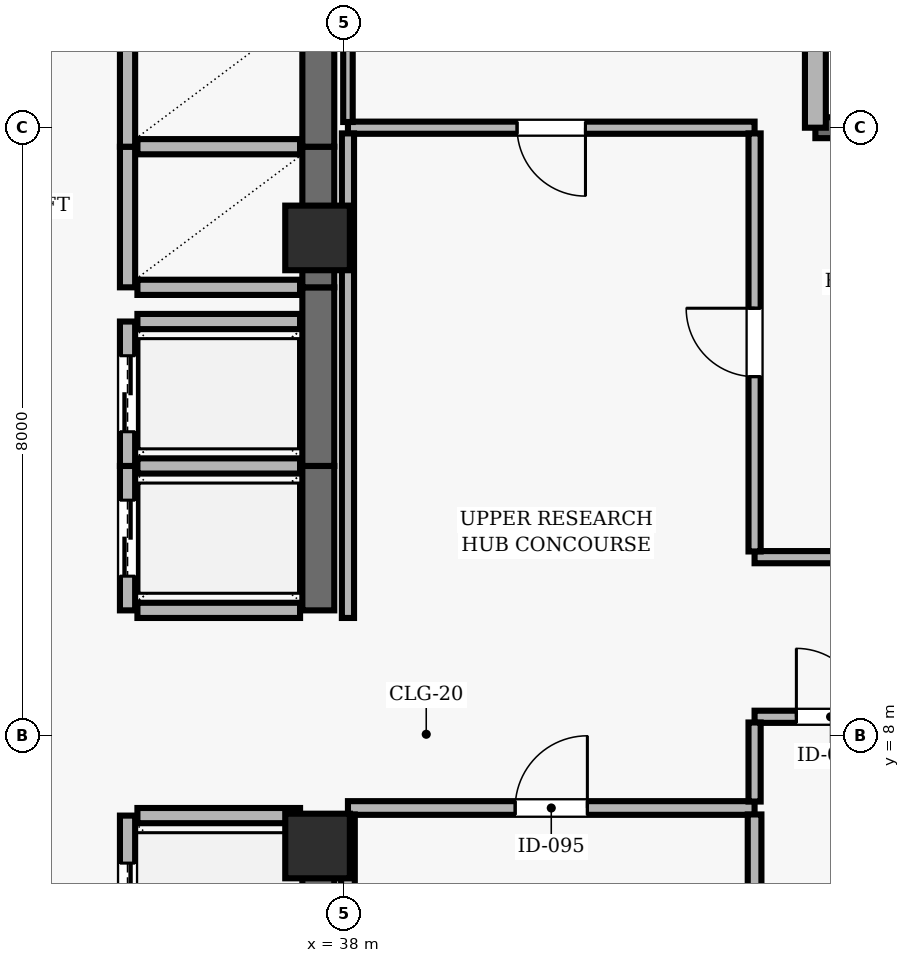
"""IFC4 building model, lengths in metres.
Left out: names, types, materials, properties, quantities, classifications, styles, units other than length and angle.
Written with IfcOpenShell. Run it as: python <this file> out.ifc"""

import sys

from ifc_helpers import new_model, si_unit, direction, frame, frame_2d, origin, origin_2d, place, context, subcontext, project, spatial, rectangle, extrude, element, fill, save


model = new_model("IFC4")
c1 = context("Model", 3, precision=1e-05, world=origin(), true_north=direction((0.0, 1.0)))
c2 = subcontext(c1, "Body", "Model", "MODEL_VIEW")
j1 = project(units=[si_unit("LENGTHUNIT", "METRE"), si_unit("PLANEANGLEUNIT", "RADIAN")], contexts=[c1])
p1 = place(None, origin())
s1 = spatial("IfcSite", under=j1, at=p1, CompositionType="ELEMENT")
p2 = place(p1, origin())
s2 = spatial("IfcBuilding", under=s1, at=p2, CompositionType="ELEMENT")
p3 = place(p2, frame((0.0, 0.0, 267.7)))
s3 = spatial("IfcBuildingStorey", under=s2, at=p3, CompositionType="ELEMENT", Elevation=267.7)
for number, where, z_axis, x_axis in (
    (1, (37.65, 6.55, 0.0), (0.0, 0.0, 1.0), (1.0, 0.0, 0.0)),
    (2, (37.65, 14.55, 0.0), (0.0, 0.0, 1.0), (1.0, 0.0, 0.0)),
):
    element("IfcColumn", number, at=place(p3, frame(where, z_axis=z_axis, x_axis=x_axis)), inside=s3, PredefinedType="COLUMN", context=c2, shape_type="SweptSolid", body=[
        extrude(rectangle(XDim=0.85, YDim=0.85, at=origin_2d()), origin(), (0.0, 0.0, 1.0), 3.9),
    ])
p4 = place(p3, frame((57.3, 16.0, 0.0), z_axis=(0.0, 0.0, 1.0), x_axis=(-1.0, 0.0, 0.0)))
e3 = element("IfcWall", 3, at=p4, inside=s3, PredefinedType="SOLIDWALL", context=c2, shape_type="SweptSolid", body=[
    extrude(rectangle(XDim=13.1, YDim=0.275, at=frame_2d((6.55, 0.0))), origin(), (0.0, 0.0, 1.0), 3.69),
])
p5 = place(p4, frame((7.05, 0.0, 0.0)))
e4 = element("IfcOpeningElement", 4, at=p5, cuts=e3, PredefinedType="OPENING", context=c2, shape_type="SweptSolid", body=[
    extrude(rectangle(XDim=1.0, YDim=2.2, at=frame_2d((0.5, 1.1))), frame((0.0, 0.147, 0.0), z_axis=(0.0, -1.0, 0.0), x_axis=(1.0, 0.0, 0.0)), (0.0, 0.0, 1.0), 0.295),
])
p6 = place(p4, frame((2.375, 0.0, 0.9)))
e5 = element("IfcOpeningElement", 5, at=p6, cuts=e3, PredefinedType="OPENING", context=c2, shape_type="SweptSolid", body=[
    extrude(rectangle(XDim=1.8, YDim=2.2, at=frame_2d((0.9, 1.1))), frame((0.0, 0.147, 0.0), z_axis=(0.0, -1.0, 0.0), x_axis=(1.0, 0.0, 0.0)), (0.0, 0.0, 1.0), 0.295),
])
p7 = place(p3, frame((44.2, 16.0, 0.0), z_axis=(0.0, 0.0, 1.0), x_axis=(0.0, 1.0, 0.0)))
e6 = element("IfcWall", 6, at=p7, inside=s3, PredefinedType="SOLIDWALL", context=c2, shape_type="SweptSolid", body=[
    extrude(rectangle(XDim=5.4, YDim=0.275, at=frame_2d((2.7, 0.0))), origin(), (0.0, 0.0, 1.0), 3.69),
])
p8 = place(p7, frame((1.5, 0.0, 0.9)))
e7 = element("IfcOpeningElement", 7, at=p8, cuts=e6, PredefinedType="OPENING", context=c2, shape_type="SweptSolid", body=[
    extrude(rectangle(XDim=2.4, YDim=2.2, at=frame_2d((1.2, 1.1))), frame((0.0, 0.147, 0.0), z_axis=(0.0, -1.0, 0.0), x_axis=(1.0, 0.0, 0.0)), (0.0, 0.0, 1.0), 0.295),
])
p9 = place(p3, frame((35.15, 6.95, 0.0), z_axis=(0.0, 0.0, 1.0), x_axis=(0.0, -1.0, 0.0)))
e8 = element("IfcWall", 8, at=p9, inside=s3, PredefinedType="SOLIDWALL", context=c2, shape_type="SweptSolid", body=[
    extrude(rectangle(XDim=2.25, YDim=0.2, at=frame_2d((1.125, 0.0))), origin(), (0.0, 0.0, 1.0), 3.69),
])
p10 = place(p9, frame((0.625, 0.0, 0.0)))
e9 = element("IfcOpeningElement", 9, at=p10, cuts=e8, PredefinedType="OPENING", context=c2, shape_type="SweptSolid", body=[
    extrude(rectangle(XDim=1.0, YDim=2.1, at=frame_2d((0.5, 1.05))), frame((0.0, 0.11, 0.0), z_axis=(0.0, -1.0, 0.0), x_axis=(1.0, 0.0, 0.0)), (0.0, 0.0, 1.0), 0.22),
])
p11 = place(p3, frame((37.66, 4.7, 0.0), z_axis=(0.0, 0.0, 1.0), x_axis=(0.0, 1.0, 0.0)))
e10 = element("IfcWall", 10, at=p11, inside=s3, PredefinedType="SHEAR", context=c2, shape_type="SweptSolid", body=[
    extrude(rectangle(XDim=2.25, YDim=0.42, at=frame_2d((1.125, 0.0))), origin(), (0.0, 0.0, 1.0), 3.69),
])
p12 = place(p3, frame((37.42, 6.95, 0.0), z_axis=(0.0, 0.0, 1.0), x_axis=(-1.0, 0.0, 0.0)))
e11 = element("IfcWall", 11, at=p12, inside=s3, PredefinedType="SOLIDWALL", context=c2, shape_type="SweptSolid", body=[
    extrude(rectangle(XDim=2.14, YDim=0.2, at=frame_2d((1.07, 0.0))), origin(), (0.0, 0.0, 1.0), 3.69),
])
p13 = place(p3, frame((35.15, 11.55, 0.0), z_axis=(0.0, 0.0, 1.0), x_axis=(0.0, -1.0, 0.0)))
e12 = element("IfcWall", 12, at=p13, inside=s3, PredefinedType="SOLIDWALL", context=c2, shape_type="SweptSolid", body=[
    extrude(rectangle(XDim=1.9, YDim=0.2, at=frame_2d((0.95, 0.0))), origin(), (0.0, 0.0, 1.0), 3.69),
])
p14 = place(p13, frame((0.45, 0.0, 0.0)))
e13 = element("IfcOpeningElement", 13, at=p14, cuts=e12, PredefinedType="OPENING", context=c2, shape_type="SweptSolid", body=[
    extrude(rectangle(XDim=1.0, YDim=2.1, at=frame_2d((0.5, 1.05))), frame((0.0, 0.11, 0.0), z_axis=(0.0, -1.0, 0.0), x_axis=(1.0, 0.0, 0.0)), (0.0, 0.0, 1.0), 0.22),
])
p15 = place(p3, frame((37.66, 9.65, 0.0), z_axis=(0.0, 0.0, 1.0), x_axis=(0.0, 1.0, 0.0)))
e14 = element("IfcWall", 14, at=p15, inside=s3, PredefinedType="SHEAR", context=c2, shape_type="SweptSolid", body=[
    extrude(rectangle(XDim=1.9, YDim=0.42, at=frame_2d((0.95, 0.0))), origin(), (0.0, 0.0, 1.0), 3.69),
])
for number, where, z_axis, x_axis in (
    (15, (35.28, 9.65, 0.0), (0.0, 0.0, 1.0), (1.0, 0.0, 0.0)),
    (16, (37.42, 11.55, 0.0), (0.0, 0.0, 1.0), (-1.0, 0.0, 0.0)),
):
    element("IfcWall", number, at=place(p3, frame(where, z_axis=z_axis, x_axis=x_axis)), inside=s3, PredefinedType="SOLIDWALL", context=c2, shape_type="SweptSolid", body=[
        extrude(rectangle(XDim=2.14, YDim=0.2, at=frame_2d((1.07, 0.0))), origin(), (0.0, 0.0, 1.0), 3.69),
    ])
p16 = place(p3, frame((35.15, 13.45, 0.0), z_axis=(0.0, 0.0, 1.0), x_axis=(0.0, -1.0, 0.0)))
e17 = element("IfcWall", 17, at=p16, inside=s3, PredefinedType="SOLIDWALL", context=c2, shape_type="SweptSolid", body=[
    extrude(rectangle(XDim=1.9, YDim=0.2, at=frame_2d((0.95, 0.0))), origin(), (0.0, 0.0, 1.0), 3.69),
])
p17 = place(p16, frame((0.45, 0.0, 0.0)))
e18 = element("IfcOpeningElement", 18, at=p17, cuts=e17, PredefinedType="OPENING", context=c2, shape_type="SweptSolid", body=[
    extrude(rectangle(XDim=1.0, YDim=2.1, at=frame_2d((0.5, 1.05))), frame((0.0, 0.11, 0.0), z_axis=(0.0, -1.0, 0.0), x_axis=(1.0, 0.0, 0.0)), (0.0, 0.0, 1.0), 0.22),
])
p18 = place(p3, frame((37.66, 11.55, 0.0), z_axis=(0.0, 0.0, 1.0), x_axis=(0.0, 1.0, 0.0)))
e19 = element("IfcWall", 19, at=p18, inside=s3, PredefinedType="SHEAR", context=c2, shape_type="SweptSolid", body=[
    extrude(rectangle(XDim=2.35, YDim=0.42, at=frame_2d((1.175, 0.0))), origin(), (0.0, 0.0, 1.0), 3.69),
])
p19 = place(p3, frame((37.42, 13.45, 0.0), z_axis=(0.0, 0.0, 1.0), x_axis=(-1.0, 0.0, 0.0)))
e20 = element("IfcWall", 20, at=p19, inside=s3, PredefinedType="SOLIDWALL", context=c2, shape_type="SweptSolid", body=[
    extrude(rectangle(XDim=2.14, YDim=0.2, at=frame_2d((1.07, 0.0))), origin(), (0.0, 0.0, 1.0), 3.69),
])
p20 = place(p3, frame((35.15, 15.75, 0.0), z_axis=(0.0, 0.0, 1.0), x_axis=(0.0, -1.0, 0.0)))
e21 = element("IfcWall", 21, at=p20, inside=s3, PredefinedType="SOLIDWALL", context=c2, shape_type="SweptSolid", body=[
    extrude(rectangle(XDim=1.85, YDim=0.2, at=frame_2d((0.925, 0.0))), origin(), (0.0, 0.0, 1.0), 3.69),
])
p21 = place(p3, frame((37.66, 13.9, 0.0), z_axis=(0.0, 0.0, 1.0), x_axis=(0.0, 1.0, 0.0)))
e22 = element("IfcWall", 22, at=p21, inside=s3, PredefinedType="SHEAR", context=c2, shape_type="SweptSolid", body=[
    extrude(rectangle(XDim=1.85, YDim=0.42, at=frame_2d((0.925, 0.0))), origin(), (0.0, 0.0, 1.0), 3.69),
])
for number, where, z_axis, x_axis in (
    (23, (35.28, 13.9, 0.0), (0.0, 0.0, 1.0), (1.0, 0.0, 0.0)),
    (24, (37.42, 15.75, 0.0), (0.0, 0.0, 1.0), (-1.0, 0.0, 0.0)),
):
    element("IfcWall", number, at=place(p3, frame(where, z_axis=z_axis, x_axis=x_axis)), inside=s3, PredefinedType="SOLIDWALL", context=c2, shape_type="SweptSolid", body=[
        extrude(rectangle(XDim=2.14, YDim=0.2, at=frame_2d((1.07, 0.0))), origin(), (0.0, 0.0, 1.0), 3.69),
    ])
p22 = place(p3, frame((35.15, 17.6, 0.0), z_axis=(0.0, 0.0, 1.0), x_axis=(0.0, -1.0, 0.0)))
e25 = element("IfcWall", 25, at=p22, inside=s3, PredefinedType="SOLIDWALL", context=c2, shape_type="SweptSolid", body=[
    extrude(rectangle(XDim=1.85, YDim=0.2, at=frame_2d((0.925, 0.0))), origin(), (0.0, 0.0, 1.0), 3.69),
])
p23 = place(p3, frame((37.66, 15.75, 0.0), z_axis=(0.0, 0.0, 1.0), x_axis=(0.0, 1.0, 0.0)))
e26 = element("IfcWall", 26, at=p23, inside=s3, PredefinedType="SHEAR", context=c2, shape_type="SweptSolid", body=[
    extrude(rectangle(XDim=1.85, YDim=0.42, at=frame_2d((0.925, 0.0))), origin(), (0.0, 0.0, 1.0), 3.69),
])
p24 = place(p3, frame((38.05, 7.05, 0.0), z_axis=(0.0, 0.0, 1.0), x_axis=(1.0, 0.0, 0.0)))
e27 = element("IfcWall", 27, at=p24, inside=s3, PredefinedType="PARTITIONING", context=c2, shape_type="SweptSolid", body=[
    extrude(rectangle(XDim=5.35, YDim=0.18, at=frame_2d((2.675, 0.0))), origin(), (0.0, 0.0, 1.0), 3.69),
])
p25 = place(p24, frame((2.2, 0.0, 0.0)))
e28 = element("IfcOpeningElement", 28, at=p25, cuts=e27, PredefinedType="OPENING", context=c2, shape_type="SweptSolid", body=[
    extrude(rectangle(XDim=0.95, YDim=2.1, at=frame_2d((0.475, 1.05))), frame((0.0, 0.1, 0.0), z_axis=(0.0, -1.0, 0.0), x_axis=(1.0, 0.0, 0.0)), (0.0, 0.0, 1.0), 0.2),
])
p26 = place(p3, frame((43.4, 8.25, 0.0), z_axis=(0.0, 0.0, 1.0), x_axis=(1.0, 0.0, 0.0)))
e29 = element("IfcWall", 29, at=p26, inside=s3, PredefinedType="PARTITIONING", context=c2, shape_type="SweptSolid", body=[
    extrude(rectangle(XDim=4.1, YDim=0.16, at=frame_2d((2.05, 0.0))), origin(), (0.0, 0.0, 1.0), 3.227),
])
p27 = place(p26, frame((0.55, 0.0, 0.0)))
e30 = element("IfcOpeningElement", 30, at=p27, cuts=e29, PredefinedType="OPENING", context=c2, shape_type="SweptSolid", body=[
    extrude(rectangle(XDim=0.9, YDim=2.1, at=frame_2d((0.45, 1.05))), frame((0.0, 0.09, 0.0), z_axis=(0.0, -1.0, 0.0), x_axis=(1.0, 0.0, 0.0)), (0.0, 0.0, 1.0), 0.18),
])
p28 = place(p3, frame((43.4, 16.0, 0.0), z_axis=(0.0, 0.0, 1.0), x_axis=(-1.0, 0.0, 0.0)))
e31 = element("IfcWall", 31, at=p28, inside=s3, PredefinedType="PARTITIONING", context=c2, shape_type="SweptSolid", body=[
    extrude(rectangle(XDim=5.35, YDim=0.16, at=frame_2d((2.675, 0.0))), origin(), (0.0, 0.0, 1.0), 3.39),
])
p29 = place(p28, frame((2.225, 0.0, 0.0)))
e32 = element("IfcOpeningElement", 32, at=p29, cuts=e31, PredefinedType="OPENING", context=c2, shape_type="SweptSolid", body=[
    extrude(rectangle(XDim=0.9, YDim=2.1, at=frame_2d((0.45, 1.05))), frame((0.0, 0.09, 0.0), z_axis=(0.0, -1.0, 0.0), x_axis=(1.0, 0.0, 0.0)), (0.0, 0.0, 1.0), 0.18),
])
p30 = place(p3, frame((47.5, 10.35, 0.0), z_axis=(0.0, 0.0, 1.0), x_axis=(-1.0, 0.0, 0.0)))
e33 = element("IfcWall", 33, at=p30, inside=s3, PredefinedType="PARTITIONING", context=c2, shape_type="SweptSolid", body=[
    extrude(rectangle(XDim=4.1, YDim=0.16, at=frame_2d((2.05, 0.0))), origin(), (0.0, 0.0, 1.0), 3.424),
])
p31 = place(p3, frame((38.05, 6.965, 0.0), z_axis=(0.0, 0.0, 1.0), x_axis=(0.0, -1.0, 0.0)))
e34 = element("IfcWall", 34, at=p31, inside=s3, PredefinedType="PARTITIONING", context=c2, shape_type="SweptSolid", body=[
    extrude(rectangle(XDim=6.832, YDim=0.18, at=frame_2d((3.416, 0.0))), origin(), (0.0, 0.0, 1.0), 3.227),
])
p32 = place(p3, frame((38.05, 15.925, 0.0), z_axis=(0.0, 0.0, 1.0), x_axis=(0.0, -1.0, 0.0)))
e35 = element("IfcWall", 35, at=p32, inside=s3, PredefinedType="PARTITIONING", context=c2, shape_type="SweptSolid", body=[
    extrude(rectangle(XDim=6.375, YDim=0.16, at=frame_2d((3.188, 0.0))), origin(), (0.0, 0.0, 1.0), 3.227),
])
p33 = place(p3, frame((38.05, 22.468, 0.0), z_axis=(0.0, 0.0, 1.0), x_axis=(0.0, -1.0, 0.0)))
e36 = element("IfcWall", 36, at=p33, inside=s3, PredefinedType="PARTITIONING", context=c2, shape_type="SweptSolid", body=[
    extrude(rectangle(XDim=6.393, YDim=0.125, at=frame_2d((3.197, 0.0))), origin(), (0.0, 0.0, 1.0), 3.227),
])
p34 = place(p3, frame((43.4, 0.133, 0.0), z_axis=(0.0, 0.0, 1.0), x_axis=(0.0, 1.0, 0.0)))
e37 = element("IfcWall", 37, at=p34, inside=s3, PredefinedType="PARTITIONING", context=c2, shape_type="SweptSolid", body=[
    extrude(rectangle(XDim=6.832, YDim=0.18, at=frame_2d((3.416, 0.0))), origin(), (0.0, 0.0, 1.0), 3.69),
])
p35 = place(p3, frame((43.4, 7.135, 0.0), z_axis=(0.0, 0.0, 1.0), x_axis=(0.0, 1.0, 0.0)))
e38 = element("IfcWall", 38, at=p35, inside=s3, PredefinedType="PARTITIONING", context=c2, shape_type="SweptSolid", body=[
    extrude(rectangle(XDim=1.04, YDim=0.16, at=frame_2d((0.52, 0.0))), origin(), (0.0, 0.0, 1.0), 3.69),
])
p36 = place(p3, frame((43.4, 10.425, 0.0), z_axis=(0.0, 0.0, 1.0), x_axis=(0.0, 1.0, 0.0)))
e39 = element("IfcWall", 39, at=p36, inside=s3, PredefinedType="PARTITIONING", context=c2, shape_type="SweptSolid", body=[
    extrude(rectangle(XDim=5.5, YDim=0.16, at=frame_2d((2.75, 0.0))), origin(), (0.0, 0.0, 1.0), 3.69),
])
p37 = place(p36, frame((2.3, 0.0, 0.0)))
e40 = element("IfcOpeningElement", 40, at=p37, cuts=e39, PredefinedType="OPENING", context=c2, shape_type="SweptSolid", body=[
    extrude(rectangle(XDim=0.9, YDim=2.1, at=frame_2d((0.45, 1.05))), frame((0.0, 0.09, 0.0), z_axis=(0.0, -1.0, 0.0), x_axis=(1.0, 0.0, 0.0)), (0.0, 0.0, 1.0), 0.18),
])
p38 = place(p10, origin())
e41 = element("IfcDoor", 41, at=p38, inside=s3, OperationType="DOUBLE_DOOR_SLIDING", PredefinedType="DOOR", context=c2, shape_type="SweptSolid", body=[
    extrude(rectangle(XDim=1.0, YDim=2.1, at=frame_2d((0.5, 1.05))), frame((0.0, 0.025, 0.0), z_axis=(0.0, -1.0, 0.0), x_axis=(1.0, 0.0, 0.0)), (0.0, 0.0, 1.0), 0.05),
])
fill(e9, e41)
p39 = place(p14, origin())
e42 = element("IfcDoor", 42, at=p39, inside=s3, OperationType="DOUBLE_DOOR_SLIDING", PredefinedType="DOOR", context=c2, shape_type="SweptSolid", body=[
    extrude(rectangle(XDim=1.0, YDim=2.1, at=frame_2d((0.5, 1.05))), frame((0.0, 0.025, 0.0), z_axis=(0.0, -1.0, 0.0), x_axis=(1.0, 0.0, 0.0)), (0.0, 0.0, 1.0), 0.05),
])
fill(e13, e42)
p40 = place(p17, origin())
e43 = element("IfcDoor", 43, at=p40, inside=s3, OperationType="DOUBLE_DOOR_SLIDING", PredefinedType="DOOR", context=c2, shape_type="SweptSolid", body=[
    extrude(rectangle(XDim=1.0, YDim=2.1, at=frame_2d((0.5, 1.05))), frame((0.0, 0.025, 0.0), z_axis=(0.0, -1.0, 0.0), x_axis=(1.0, 0.0, 0.0)), (0.0, 0.0, 1.0), 0.05),
])
fill(e18, e43)
p41 = place(p25, origin())
e44 = element("IfcDoor", 44, at=p41, inside=s3, OperationType="SINGLE_SWING_RIGHT", PredefinedType="DOOR", context=c2, shape_type="SweptSolid", body=[
    extrude(rectangle(XDim=0.95, YDim=2.1, at=frame_2d((0.475, 1.05))), frame((0.0, 0.025, 0.0), z_axis=(0.0, -1.0, 0.0), x_axis=(1.0, 0.0, 0.0)), (0.0, 0.0, 1.0), 0.05),
])
fill(e28, e44)
p42 = place(p27, origin())
e45 = element("IfcDoor", 45, at=p42, inside=s3, OperationType="SINGLE_SWING_LEFT", PredefinedType="DOOR", context=c2, shape_type="SweptSolid", body=[
    extrude(rectangle(XDim=0.9, YDim=2.1, at=frame_2d((0.45, 1.05))), frame((0.0, 0.025, 0.0), z_axis=(0.0, -1.0, 0.0), x_axis=(1.0, 0.0, 0.0)), (0.0, 0.0, 1.0), 0.05),
])
fill(e30, e45)
p43 = place(p37, origin())
e46 = element("IfcDoor", 46, at=p43, inside=s3, OperationType="SINGLE_SWING_RIGHT", PredefinedType="DOOR", context=c2, shape_type="SweptSolid", body=[
    extrude(rectangle(XDim=0.9, YDim=2.1, at=frame_2d((0.45, 1.05))), frame((0.0, 0.025, 0.0), z_axis=(0.0, -1.0, 0.0), x_axis=(1.0, 0.0, 0.0)), (0.0, 0.0, 1.0), 0.05),
])
fill(e40, e46)
p44 = place(p29, origin())
e47 = element("IfcDoor", 47, at=p44, inside=s3, OperationType="SINGLE_SWING_LEFT", PredefinedType="DOOR", context=c2, shape_type="SweptSolid", body=[
    extrude(rectangle(XDim=0.9, YDim=2.1, at=frame_2d((0.45, 1.05))), frame((0.0, 0.025, 0.0), z_axis=(0.0, -1.0, 0.0), x_axis=(1.0, 0.0, 0.0)), (0.0, 0.0, 1.0), 0.05),
])
fill(e32, e47)
save(model, sys.argv[1])
